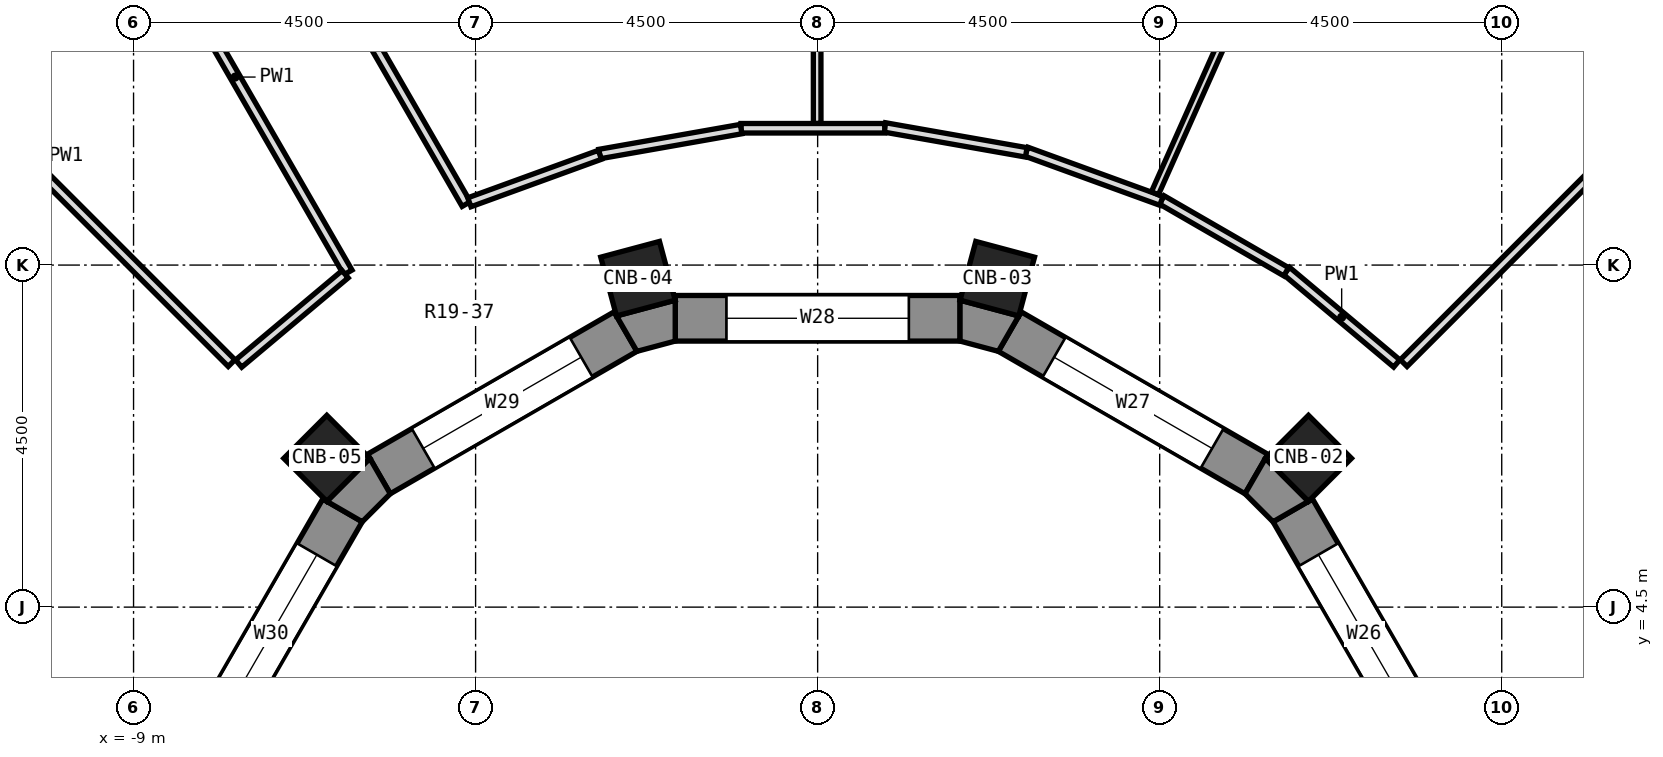
"""IFC4 building model, lengths in metres.
Left out: names, types, materials, properties, quantities, classifications, styles, units other than length and angle.
Written with IfcOpenShell. Run it as: python <this file> out.ifc"""

import sys

from ifc_helpers import new_model, si_unit, direction, frame, frame_2d, origin, origin_2d, place, context, subcontext, project, spatial, polyline, rectangle, outline, extrude, element, fill, save


model = new_model("IFC4")
c1 = context("Model", 3, precision=1e-05, world=origin(), true_north=direction((0.0, 1.0)))
c2 = subcontext(c1, "Body", "Model", "MODEL_VIEW")
j1 = project(units=[si_unit("LENGTHUNIT", "METRE"), si_unit("PLANEANGLEUNIT", "RADIAN")], contexts=[c1])
p1 = place(None, origin())
s1 = spatial("IfcSite", under=j1, at=p1, CompositionType="ELEMENT")
p2 = place(p1, origin())
s2 = spatial("IfcBuilding", under=s1, at=p2, CompositionType="ELEMENT")
p3 = place(p2, frame((0.0, 0.0, 111.7)))
s3 = spatial("IfcBuildingStorey", under=s2, at=p3, CompositionType="ELEMENT", Elevation=111.7)
for number, where, z_axis, x_axis in (
    (1, (6.458, 6.458, 0.0), (0.0, 0.0, 1.0), (0.707, 0.707, 0.0)),
    (2, (2.364, 8.821, 0.0), (0.0, 0.0, 1.0), (0.259, 0.966, 0.0)),
    (3, (-2.364, 8.821, 0.0), (0.0, 0.0, 1.0), (-0.259, 0.966, 0.0)),
    (4, (-6.458, 6.458, 0.0), (0.0, 0.0, 1.0), (-0.707, 0.707, 0.0)),
):
    element("IfcColumn", number, at=place(p3, frame(where, z_axis=z_axis, x_axis=x_axis)), inside=s3, PredefinedType="COLUMN", context=c2, shape_type="SweptSolid", body=[
        extrude(rectangle(XDim=0.8, YDim=0.8, at=origin_2d()), origin(), (0.0, 0.0, 1.0), 3.3),
    ])
p4 = place(p3, frame((8.125, 2.527, 0.0), z_axis=(0.0, 0.0, 1.0), x_axis=(-0.499964958637, 0.86604563398, 0.0)))
e5 = element("IfcWall", 5, at=p4, inside=s3, PredefinedType="SOLIDWALL", context=c2, shape_type="SweptSolid", body=[
    extrude(rectangle(XDim=3.747, YDim=0.6, at=frame_2d((1.874, 0.0))), origin(), (0.0, 0.0, 1.0), 2.8),
])
p5 = place(p4, frame((0.674, 0.0, 0.9)))
e6 = element("IfcOpeningElement", 6, at=p5, cuts=e5, PredefinedType="OPENING", context=c2, shape_type="SweptSolid", body=[
    extrude(rectangle(XDim=2.4, YDim=1.8, at=frame_2d((1.2, 0.9))), frame((0.0, 0.312, 0.0), z_axis=(0.0, -1.0, 0.0), x_axis=(1.0, 0.0, 0.0)), (0.0, 0.0, 1.0), 0.624),
])
p6 = place(p3, frame((5.773, 6.251, 0.0), z_axis=(0.0, 0.0, 1.0), x_axis=(-0.86604563398, 0.499964958637, 0.0)))
e7 = element("IfcWall", 7, at=p6, inside=s3, PredefinedType="SOLIDWALL", context=c2, shape_type="SweptSolid", body=[
    extrude(rectangle(XDim=3.747, YDim=0.6, at=frame_2d((1.874, 0.0))), origin(), (0.0, 0.0, 1.0), 2.8),
])
p7 = place(p6, frame((0.674, 0.0, 0.9)))
e8 = element("IfcOpeningElement", 8, at=p7, cuts=e7, PredefinedType="OPENING", context=c2, shape_type="SweptSolid", body=[
    extrude(rectangle(XDim=2.4, YDim=1.8, at=frame_2d((1.2, 0.9))), frame((0.0, 0.312, 0.0), z_axis=(0.0, -1.0, 0.0), x_axis=(1.0, 0.0, 0.0)), (0.0, 0.0, 1.0), 0.624),
])
p8 = place(p3, frame((1.874, 8.3, 0.0), z_axis=(0.0, 0.0, 1.0), x_axis=(-1.0, 0.0, 0.0)))
e9 = element("IfcWall", 9, at=p8, inside=s3, PredefinedType="SOLIDWALL", context=c2, shape_type="SweptSolid", body=[
    extrude(rectangle(XDim=3.748, YDim=0.6, at=frame_2d((1.874, 0.0))), origin(), (0.0, 0.0, 1.0), 2.8),
])
p9 = place(p8, frame((0.674, 0.0, 0.9)))
e10 = element("IfcOpeningElement", 10, at=p9, cuts=e9, PredefinedType="OPENING", context=c2, shape_type="SweptSolid", body=[
    extrude(rectangle(XDim=2.4, YDim=1.8, at=frame_2d((1.2, 0.9))), frame((0.0, 0.312, 0.0), z_axis=(0.0, -1.0, 0.0), x_axis=(1.0, 0.0, 0.0)), (0.0, 0.0, 1.0), 0.624),
])
p10 = place(p3, frame((-2.527, 8.125, 0.0), z_axis=(0.0, 0.0, 1.0), x_axis=(-0.86604563398, -0.499964958637, 0.0)))
e11 = element("IfcWall", 11, at=p10, inside=s3, PredefinedType="SOLIDWALL", context=c2, shape_type="SweptSolid", body=[
    extrude(rectangle(XDim=3.747, YDim=0.6, at=frame_2d((1.874, 0.0))), origin(), (0.0, 0.0, 1.0), 2.8),
])
p11 = place(p10, frame((0.674, 0.0, 0.9)))
e12 = element("IfcOpeningElement", 12, at=p11, cuts=e11, PredefinedType="OPENING", context=c2, shape_type="SweptSolid", body=[
    extrude(rectangle(XDim=2.4, YDim=1.8, at=frame_2d((1.2, 0.9))), frame((0.0, 0.312, 0.0), z_axis=(0.0, -1.0, 0.0), x_axis=(1.0, 0.0, 0.0)), (0.0, 0.0, 1.0), 0.624),
])
p12 = place(p3, frame((-6.251, 5.773, 0.0), z_axis=(0.0, 0.0, 1.0), x_axis=(-0.499964958637, -0.86604563398, 0.0)))
e13 = element("IfcWall", 13, at=p12, inside=s3, PredefinedType="SOLIDWALL", context=c2, shape_type="SweptSolid", body=[
    extrude(rectangle(XDim=3.747, YDim=0.6, at=frame_2d((1.874, 0.0))), origin(), (0.0, 0.0, 1.0), 2.8),
])
p13 = place(p12, frame((0.674, 0.0, 0.9)))
e14 = element("IfcOpeningElement", 14, at=p13, cuts=e13, PredefinedType="OPENING", context=c2, shape_type="SweptSolid", body=[
    extrude(rectangle(XDim=2.4, YDim=1.8, at=frame_2d((1.2, 0.9))), frame((0.0, 0.312, 0.0), z_axis=(0.0, -1.0, 0.0), x_axis=(1.0, 0.0, 0.0)), (0.0, 0.0, 1.0), 0.624),
])
p14 = place(p3, origin())
e15 = element("IfcWall", 15, at=p14, inside=s3, PredefinedType="SOLIDWALL", context=c2, shape_type="SweptSolid", body=[
    extrude(outline(polyline([(5.892, 6.458), (5.623, 5.991), (5.991, 5.623), (6.458, 5.892), (5.892, 6.458)])), origin(), (0.0, 0.0, 1.0), 2.8),
])
p15 = place(p3, origin())
e16 = element("IfcWall", 16, at=p15, inside=s3, PredefinedType="SOLIDWALL", context=c2, shape_type="SweptSolid", body=[
    extrude(outline(polyline([(1.874, 8.538), (1.874, 8.0), (2.377, 7.865), (2.646, 8.331), (1.874, 8.538)])), origin(), (0.0, 0.0, 1.0), 2.8),
])
p16 = place(p3, origin())
e17 = element("IfcWall", 17, at=p16, inside=s3, PredefinedType="SOLIDWALL", context=c2, shape_type="SweptSolid", body=[
    extrude(outline(polyline([(-2.646, 8.331), (-2.377, 7.865), (-1.874, 8.0), (-1.874, 8.538), (-2.646, 8.331)])), origin(), (0.0, 0.0, 1.0), 2.8),
])
p17 = place(p3, origin())
e18 = element("IfcWall", 18, at=p17, inside=s3, PredefinedType="SOLIDWALL", context=c2, shape_type="SweptSolid", body=[
    extrude(outline(polyline([(-6.458, 5.892), (-5.991, 5.623), (-5.623, 5.991), (-5.892, 6.458), (-6.458, 5.892)])), origin(), (0.0, 0.0, 1.0), 2.8),
])
p18 = place(p3, frame((-0.011, 18.549, 0.0), z_axis=(0.0, 0.0, 1.0), x_axis=(0.00063524317, -0.999999798233, 0.0)))
e19 = element("IfcWall", 19, at=p18, inside=s3, PredefinedType="PARTITIONING", context=c2, shape_type="SweptSolid", body=[
    extrude(rectangle(XDim=7.687, YDim=0.1, at=frame_2d((3.843, 0.0))), origin(), (0.0, 0.0, 1.0), 2.8),
])
p19 = place(p18, frame((3.4, 0.0, 0.0)))
e20 = element("IfcOpeningElement", 20, at=p19, cuts=e19, PredefinedType="OPENING", context=c2, shape_type="SweptSolid", body=[
    extrude(rectangle(XDim=0.9, YDim=2.1, at=frame_2d((0.45, 1.05))), frame((0.0, 0.062, 0.0), z_axis=(0.0, -1.0, 0.0), x_axis=(1.0, 0.0, 0.0)), (0.0, 0.0, 1.0), 0.124),
])
p20 = place(p3, frame((-9.147, 14.043, 0.0), z_axis=(0.0, 0.0, 1.0), x_axis=(0.499891007886, -0.866088321267, 0.0)))
e21 = element("IfcWall", 21, at=p20, inside=s3, PredefinedType="PARTITIONING", context=c2, shape_type="SweptSolid", body=[
    extrude(rectangle(XDim=5.935, YDim=0.125, at=frame_2d((2.967, 0.0))), origin(), (0.0, 0.0, 1.0), 2.8),
])
p21 = place(p3, frame((-7.621, 14.999, 0.0), z_axis=(0.0, 0.0, 1.0), x_axis=(0.499745940409, -0.866172035478, 0.0)))
e22 = element("IfcWall", 22, at=p21, inside=s3, PredefinedType="PARTITIONING", context=c2, shape_type="SweptSolid", body=[
    extrude(rectangle(XDim=5.999, YDim=0.125, at=frame_2d((3.0, 0.0))), origin(), (0.0, 0.0, 1.0), 2.8),
])
p22 = place(p3, frame((-13.167, 13.167, 0.0), z_axis=(0.0, 0.0, 1.0), x_axis=(0.707106781187, -0.707106781187, 0.0)))
e23 = element("IfcWall", 23, at=p22, inside=s3, PredefinedType="PARTITIONING", context=c2, shape_type="SweptSolid", body=[
    extrude(rectangle(XDim=7.716, YDim=0.125, at=frame_2d((3.858, 0.0))), origin(), (0.0, 0.0, 1.0), 2.8),
])
p23 = place(p3, frame((6.169, 8.922, 0.0), z_axis=(0.0, 0.0, 1.0), x_axis=(0.766048022013, -0.642783344503, 0.0)))
e24 = element("IfcWall", 24, at=p23, inside=s3, PredefinedType="PARTITIONING", context=c2, shape_type="SweptSolid", body=[
    extrude(rectangle(XDim=1.892, YDim=0.125, at=frame_2d((0.946, 0.0))), origin(), (0.0, 0.0, 1.0), 2.8),
])
for number, where, z_axis, x_axis in (
    (25, (4.527, 9.858, 0.0), (0.0, 0.0, 1.0), (0.866, -0.5, 0.0)),
    (26, (2.746, 10.492, 0.0), (0.0, 0.0, 1.0), (0.94, -0.342, 0.0)),
):
    element("IfcWall", number, at=place(p3, frame(where, z_axis=z_axis, x_axis=x_axis)), inside=s3, PredefinedType="PARTITIONING", context=c2, shape_type="SweptSolid", body=[
        extrude(rectangle(XDim=1.89, YDim=0.125, at=frame_2d((0.945, 0.0))), origin(), (0.0, 0.0, 1.0), 2.8),
    ])
p24 = place(p3, frame((0.883, 10.811, 0.0), z_axis=(0.0, 0.0, 1.0), x_axis=(0.984822536066, -0.173564317922, 0.0)))
e27 = element("IfcWall", 27, at=p24, inside=s3, PredefinedType="PARTITIONING", context=c2, shape_type="SweptSolid", body=[
    extrude(rectangle(XDim=1.891, YDim=0.125, at=frame_2d((0.945, 0.0))), origin(), (0.0, 0.0, 1.0), 2.8),
])
p25 = place(p3, frame((-1.009, 10.8, 0.0), z_axis=(0.0, 0.0, 1.0), x_axis=(1.0, 0.0, 0.0)))
e28 = element("IfcWall", 28, at=p25, inside=s3, PredefinedType="PARTITIONING", context=c2, shape_type="SweptSolid", body=[
    extrude(rectangle(XDim=1.891, YDim=0.125, at=frame_2d((0.946, 0.0))), origin(), (0.0, 0.0, 1.0), 2.8),
])
p26 = place(p3, frame((-2.868, 10.461, 0.0), z_axis=(0.0, 0.0, 1.0), x_axis=(0.984818645033, 0.173586394613, 0.0)))
e29 = element("IfcWall", 29, at=p26, inside=s3, PredefinedType="PARTITIONING", context=c2, shape_type="SweptSolid", body=[
    extrude(rectangle(XDim=1.89, YDim=0.125, at=frame_2d((0.945, 0.0))), origin(), (0.0, 0.0, 1.0), 2.8),
])
p27 = place(p3, frame((-4.582, 9.826, 0.0), z_axis=(0.0, 0.0, 1.0), x_axis=(0.939758316357, 0.341839592261, 0.0)))
e30 = element("IfcWall", 30, at=p27, inside=s3, PredefinedType="PARTITIONING", context=c2, shape_type="SweptSolid", body=[
    extrude(rectangle(XDim=1.828, YDim=0.125, at=frame_2d((0.914, 0.0))), origin(), (0.0, 0.0, 1.0), 2.8),
])
p28 = place(p3, frame((-7.617, 7.704, 0.0), z_axis=(0.0, 0.0, 1.0), x_axis=(0.7660388271, 0.642794302538, 0.0)))
e31 = element("IfcWall", 31, at=p28, inside=s3, PredefinedType="PARTITIONING", context=c2, shape_type="SweptSolid", body=[
    extrude(rectangle(XDim=1.828, YDim=0.125, at=frame_2d((0.914, 0.0))), origin(), (0.0, 0.0, 1.0), 2.8),
])
p29 = place(p3, frame((7.71, 7.71, 0.0), z_axis=(0.0, 0.0, 1.0), x_axis=(0.707106781187, 0.707106781187, 0.0)))
e32 = element("IfcWall", 32, at=p29, inside=s3, PredefinedType="PARTITIONING", context=c2, shape_type="SweptSolid", body=[
    extrude(rectangle(XDim=7.587, YDim=0.125, at=frame_2d((3.793, 0.0))), origin(), (0.0, 0.0, 1.0), 2.8),
])
p30 = place(p3, frame((4.437, 9.945, 0.0), z_axis=(0.0, 0.0, 1.0), x_axis=(0.407452204653, 0.913226533191, 0.0)))
e33 = element("IfcWall", 33, at=p30, inside=s3, PredefinedType="PARTITIONING", context=c2, shape_type="SweptSolid", body=[
    extrude(rectangle(XDim=7.705, YDim=0.1, at=frame_2d((3.853, 0.0))), origin(), (0.0, 0.0, 1.0), 2.8),
])
p31 = place(p30, frame((3.395, 0.0, 0.0)))
e34 = element("IfcOpeningElement", 34, at=p31, cuts=e33, PredefinedType="OPENING", context=c2, shape_type="SweptSolid", body=[
    extrude(rectangle(XDim=0.9, YDim=2.1, at=frame_2d((0.45, 1.05))), frame((0.0, 0.062, 0.0), z_axis=(0.0, -1.0, 0.0), x_axis=(1.0, 0.0, 0.0)), (0.0, 0.0, 1.0), 0.124),
])
p32 = place(p5, origin())
e35 = element("IfcWindow", 35, at=p32, inside=s3, PartitioningType="SINGLE_PANEL", PredefinedType="WINDOW", context=c2, shape_type="SweptSolid", body=[
    extrude(rectangle(XDim=2.4, YDim=1.8, at=frame_2d((1.2, 0.9))), frame((0.0, -0.12, 0.0), z_axis=(0.0, -1.0, 0.0), x_axis=(1.0, 0.0, 0.0)), (0.0, 0.0, 1.0), 0.06),
])
fill(e6, e35)
p33 = place(p7, origin())
e36 = element("IfcWindow", 36, at=p33, inside=s3, PartitioningType="SINGLE_PANEL", PredefinedType="WINDOW", context=c2, shape_type="SweptSolid", body=[
    extrude(rectangle(XDim=2.4, YDim=1.8, at=frame_2d((1.2, 0.9))), frame((0.0, -0.12, 0.0), z_axis=(0.0, -1.0, 0.0), x_axis=(1.0, 0.0, 0.0)), (0.0, 0.0, 1.0), 0.06),
])
fill(e8, e36)
p34 = place(p9, origin())
e37 = element("IfcWindow", 37, at=p34, inside=s3, PartitioningType="SINGLE_PANEL", PredefinedType="WINDOW", context=c2, shape_type="SweptSolid", body=[
    extrude(rectangle(XDim=2.4, YDim=1.8, at=frame_2d((1.2, 0.9))), frame((0.0, -0.12, 0.0), z_axis=(0.0, -1.0, 0.0), x_axis=(1.0, 0.0, 0.0)), (0.0, 0.0, 1.0), 0.06),
])
fill(e10, e37)
p35 = place(p11, origin())
e38 = element("IfcWindow", 38, at=p35, inside=s3, PartitioningType="SINGLE_PANEL", PredefinedType="WINDOW", context=c2, shape_type="SweptSolid", body=[
    extrude(rectangle(XDim=2.4, YDim=1.8, at=frame_2d((1.2, 0.9))), frame((0.0, -0.12, 0.0), z_axis=(0.0, -1.0, 0.0), x_axis=(1.0, 0.0, 0.0)), (0.0, 0.0, 1.0), 0.06),
])
fill(e12, e38)
p36 = place(p13, origin())
e39 = element("IfcWindow", 39, at=p36, inside=s3, PartitioningType="SINGLE_PANEL", PredefinedType="WINDOW", context=c2, shape_type="SweptSolid", body=[
    extrude(rectangle(XDim=2.4, YDim=1.8, at=frame_2d((1.2, 0.9))), frame((0.0, -0.12, 0.0), z_axis=(0.0, -1.0, 0.0), x_axis=(1.0, 0.0, 0.0)), (0.0, 0.0, 1.0), 0.06),
])
fill(e14, e39)
save(model, sys.argv[1])
